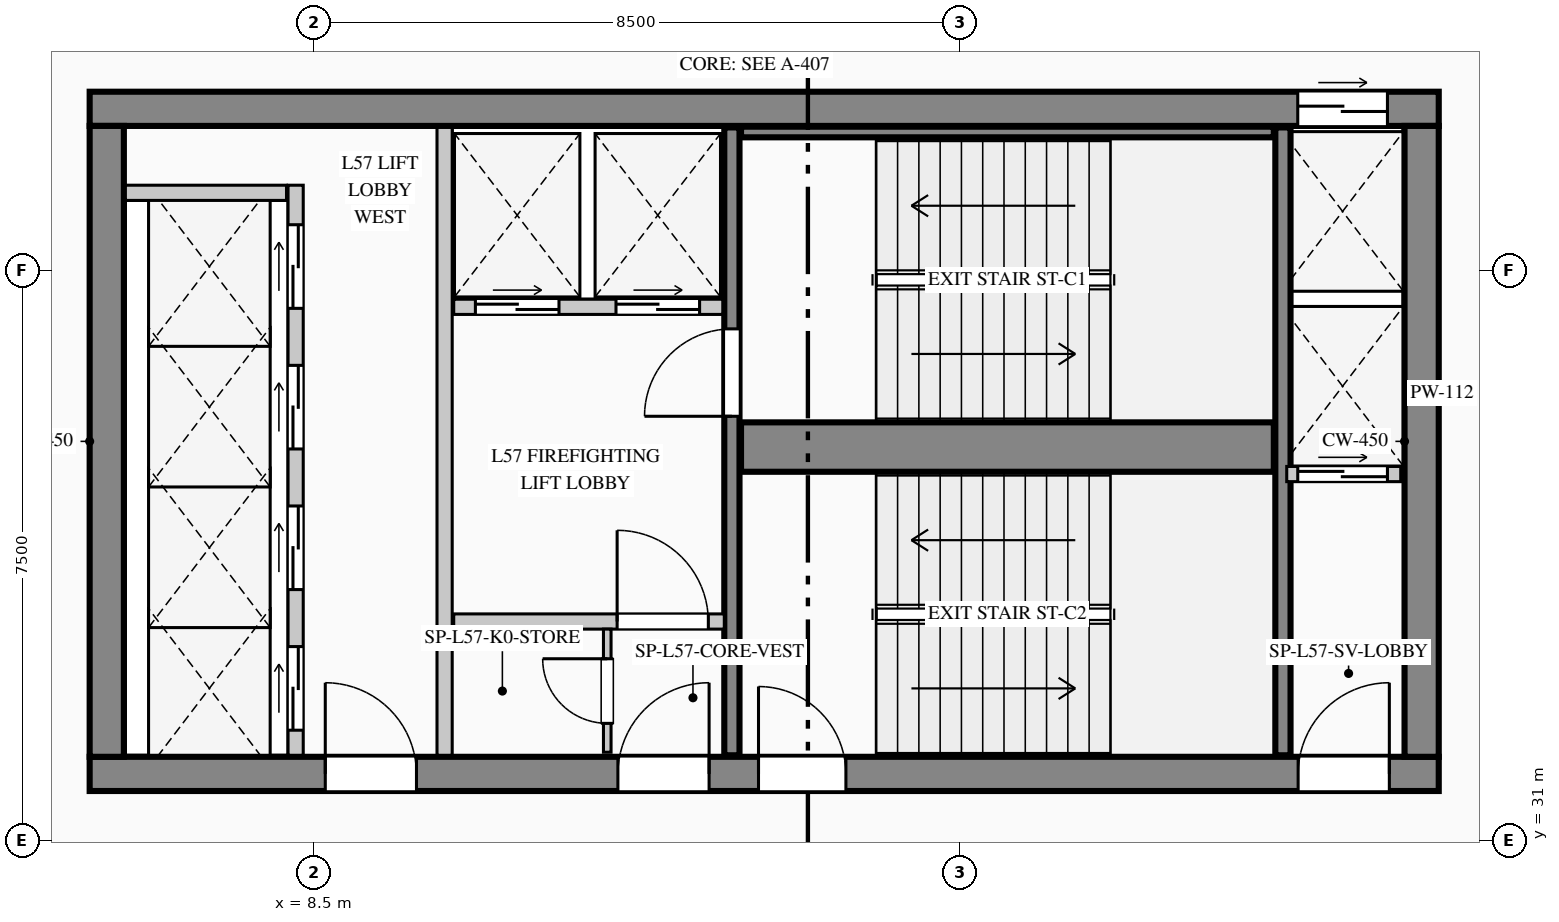
"""IFC4 building model, lengths in metres.
Left out: names, types, materials, properties, quantities, classifications, styles, units other than length and angle.
Written with IfcOpenShell. Run it as: python <this file> out.ifc"""

import sys

from ifc_helpers import new_model, si_unit, direction, frame, frame_2d, origin, place, context, subcontext, project, spatial, rectangle, extrude, element, fill, save


model = new_model("IFC4")
c1 = context("Model", 3, precision=1e-05, world=origin(), true_north=direction((0.0, 1.0)))
c2 = subcontext(c1, "Body", "Model", "MODEL_VIEW")
j1 = project(units=[si_unit("LENGTHUNIT", "METRE"), si_unit("PLANEANGLEUNIT", "RADIAN")], contexts=[c1])
p1 = place(None, origin())
s1 = spatial("IfcSite", under=j1, at=p1, CompositionType="ELEMENT")
p2 = place(p1, origin())
s2 = spatial("IfcBuilding", under=s1, at=p2, CompositionType="ELEMENT")
p3 = place(p2, frame((0.0, 0.0, 239.05)))
s3 = spatial("IfcBuildingStorey", under=s2, at=p3, CompositionType="ELEMENT", Elevation=239.05)
p4 = place(p3, frame((5.55, 40.625, 0.0), z_axis=(0.0, 0.0, 1.0), x_axis=(1.0, 0.0, 0.0)))
e1 = element("IfcWall", 1, at=p4, inside=s3, PredefinedType="SHEAR", context=c2, shape_type="SweptSolid", body=[
    extrude(rectangle(XDim=17.75, YDim=0.45, at=frame_2d((8.875, 0.0))), origin(), (0.0, 0.0, 1.0), 3.95),
])
p5 = place(p4, frame((15.895, 0.0, 0.0)))
e2 = element("IfcOpeningElement", 2, at=p5, cuts=e1, PredefinedType="OPENING", context=c2, shape_type="SweptSolid", body=[
    extrude(rectangle(XDim=1.18, YDim=2.25, at=frame_2d((0.59, 1.125))), frame((0.0, 0.235, 0.0), z_axis=(0.0, -1.0, 0.0), x_axis=(1.0, 0.0, 0.0)), (0.0, 0.0, 1.0), 0.47),
])
p6 = place(p3, frame((5.55, 31.875, 0.0), z_axis=(0.0, 0.0, 1.0), x_axis=(1.0, 0.0, 0.0)))
e3 = element("IfcWall", 3, at=p6, inside=s3, PredefinedType="SHEAR", context=c2, shape_type="SweptSolid", body=[
    extrude(rectangle(XDim=17.75, YDim=0.45, at=frame_2d((8.875, 0.0))), origin(), (0.0, 0.0, 1.0), 3.95),
])
p7 = place(p6, frame((3.1, 0.0, 0.0)))
e4 = element("IfcOpeningElement", 4, at=p7, cuts=e3, PredefinedType="OPENING", context=c2, shape_type="SweptSolid", body=[
    extrude(rectangle(XDim=1.2, YDim=2.2, at=frame_2d((0.6, 1.1))), frame((0.0, 0.235, 0.0), z_axis=(0.0, -1.0, 0.0), x_axis=(1.0, 0.0, 0.0)), (0.0, 0.0, 1.0), 0.47),
])
p8 = place(p6, frame((6.95, 0.0, 0.0)))
e5 = element("IfcOpeningElement", 5, at=p8, cuts=e3, PredefinedType="OPENING", context=c2, shape_type="SweptSolid", body=[
    extrude(rectangle(XDim=1.2, YDim=2.2, at=frame_2d((0.6, 1.1))), frame((0.0, 0.235, 0.0), z_axis=(0.0, -1.0, 0.0), x_axis=(1.0, 0.0, 0.0)), (0.0, 0.0, 1.0), 0.47),
])
p9 = place(p6, frame((8.8, 0.0, 0.0)))
e6 = element("IfcOpeningElement", 6, at=p9, cuts=e3, PredefinedType="OPENING", context=c2, shape_type="SweptSolid", body=[
    extrude(rectangle(XDim=1.15, YDim=2.2, at=frame_2d((0.575, 1.1))), frame((0.0, 0.235, 0.0), z_axis=(0.0, -1.0, 0.0), x_axis=(1.0, 0.0, 0.0)), (0.0, 0.0, 1.0), 0.47),
])
p10 = place(p6, frame((15.9, 0.0, 0.0)))
e7 = element("IfcOpeningElement", 7, at=p10, cuts=e3, PredefinedType="OPENING", context=c2, shape_type="SweptSolid", body=[
    extrude(rectangle(XDim=1.2, YDim=2.2, at=frame_2d((0.6, 1.1))), frame((0.0, 0.235, 0.0), z_axis=(0.0, -1.0, 0.0), x_axis=(1.0, 0.0, 0.0)), (0.0, 0.0, 1.0), 0.47),
])
for number, where, z_axis, x_axis in (
    (8, (5.775, 32.1, 0.0), (0.0, 0.0, 1.0), (0.0, 1.0, 0.0)),
    (9, (23.075, 32.1, 0.0), (0.0, 0.0, 1.0), (0.0, 1.0, 0.0)),
):
    element("IfcWall", number, at=place(p3, frame(where, z_axis=z_axis, x_axis=x_axis)), inside=s3, PredefinedType="SHEAR", context=c2, shape_type="SweptSolid", body=[
        extrude(rectangle(XDim=8.3, YDim=0.45, at=frame_2d((4.15, 0.0))), origin(), (0.0, 0.0, 1.0), 3.95),
    ])
p11 = place(p3, frame((14.0, 32.12, 0.0), z_axis=(0.0, 0.0, 1.0), x_axis=(0.0, 1.0, 0.0)))
e10 = element("IfcWall", 10, at=p11, inside=s3, PredefinedType="SHEAR", context=c2, shape_type="SweptSolid", body=[
    extrude(rectangle(XDim=8.26, YDim=0.2, at=frame_2d((4.13, 0.0))), origin(), (0.0, 0.0, 1.0), 3.95),
])
p12 = place(p11, frame((4.46, 0.0, 0.0)))
e11 = element("IfcOpeningElement", 11, at=p12, cuts=e10, PredefinedType="OPENING", context=c2, shape_type="SweptSolid", body=[
    extrude(rectangle(XDim=1.15, YDim=2.2, at=frame_2d((0.575, 1.1))), frame((0.0, 0.11, 0.0), z_axis=(0.0, -1.0, 0.0), x_axis=(1.0, 0.0, 0.0)), (0.0, 0.0, 1.0), 0.22),
])
p13 = place(p3, frame((14.12, 36.175, 0.0), z_axis=(0.0, 0.0, 1.0), x_axis=(1.0, 0.0, 0.0)))
e12 = element("IfcWall", 12, at=p13, inside=s3, PredefinedType="SHEAR", context=c2, shape_type="SweptSolid", body=[
    extrude(rectangle(XDim=7.01, YDim=0.65, at=frame_2d((3.505, 0.0))), origin(), (0.0, 0.0, 1.0), 3.95),
])
p14 = place(p3, frame((21.25, 32.12, 0.0), z_axis=(0.0, 0.0, 1.0), x_axis=(0.0, 1.0, 0.0)))
e13 = element("IfcWall", 13, at=p14, inside=s3, PredefinedType="SHEAR", context=c2, shape_type="SweptSolid", body=[
    extrude(rectangle(XDim=8.26, YDim=0.2, at=frame_2d((4.13, 0.0))), origin(), (0.0, 0.0, 1.0), 3.95),
])
p15 = place(p3, frame((14.12, 40.32, 0.0), z_axis=(0.0, 0.0, 1.0), x_axis=(1.0, 0.0, 0.0)))
e14 = element("IfcWall", 14, at=p15, inside=s3, PredefinedType="SHEAR", context=c2, shape_type="SweptSolid", body=[
    extrude(rectangle(XDim=7.01, YDim=0.14, at=frame_2d((3.505, 0.0))), origin(), (0.0, 0.0, 1.0), 3.95),
])
p16 = place(p3, frame((6.933, 4.52, 0.0), z_axis=(0.0, 0.0, 1.0), x_axis=(-0.109965284523, 0.993935428587, 0.0)))
e15 = element("IfcWall", 15, at=p16, inside=s3, PredefinedType="STANDARD", context=c2, shape_type="SweptSolid", body=[
    extrude(rectangle(XDim=37.186, YDim=0.24, at=frame_2d((18.593, 0.0))), origin(), (0.0, 0.0, 1.0), 3.7),
])
p17 = place(p16, frame((12.562, 0.0, 0.9)))
e16 = element("IfcOpeningElement", 16, at=p17, cuts=e15, PredefinedType="OPENING", context=c2, shape_type="SweptSolid", body=[
    extrude(rectangle(XDim=1.65, YDim=1.95, at=frame_2d((0.825, 0.975))), frame((0.0, 0.13, 0.0), z_axis=(0.0, -1.0, 0.0), x_axis=(1.0, 0.0, 0.0)), (0.0, 0.0, 1.0), 0.26),
])
p18 = place(p3, frame((8.26, 32.12, 0.0), z_axis=(0.0, 0.0, 1.0), x_axis=(0.0, 1.0, 0.0)))
e17 = element("IfcWall", 17, at=p18, inside=s3, PredefinedType="PARTITIONING", context=c2, shape_type="SweptSolid", body=[
    extrude(rectangle(XDim=7.5, YDim=0.2, at=frame_2d((3.75, 0.0))), origin(), (0.0, 0.0, 1.0), 3.7),
])
p19 = place(p18, frame((0.33, 0.0, 0.0)))
e18 = element("IfcOpeningElement", 18, at=p19, cuts=e17, PredefinedType="OPENING", context=c2, shape_type="SweptSolid", body=[
    extrude(rectangle(XDim=1.1, YDim=2.2, at=frame_2d((0.55, 1.1))), frame((0.0, 0.11, 0.0), z_axis=(0.0, -1.0, 0.0), x_axis=(1.0, 0.0, 0.0)), (0.0, 0.0, 1.0), 0.22),
])
p20 = place(p18, frame((2.18, 0.0, 0.0)))
e19 = element("IfcOpeningElement", 19, at=p20, cuts=e17, PredefinedType="OPENING", context=c2, shape_type="SweptSolid", body=[
    extrude(rectangle(XDim=1.1, YDim=2.2, at=frame_2d((0.55, 1.1))), frame((0.0, 0.11, 0.0), z_axis=(0.0, -1.0, 0.0), x_axis=(1.0, 0.0, 0.0)), (0.0, 0.0, 1.0), 0.22),
])
p21 = place(p18, frame((4.03, 0.0, 0.0)))
e20 = element("IfcOpeningElement", 20, at=p21, cuts=e17, PredefinedType="OPENING", context=c2, shape_type="SweptSolid", body=[
    extrude(rectangle(XDim=1.1, YDim=2.2, at=frame_2d((0.55, 1.1))), frame((0.0, 0.11, 0.0), z_axis=(0.0, -1.0, 0.0), x_axis=(1.0, 0.0, 0.0)), (0.0, 0.0, 1.0), 0.22),
])
p22 = place(p18, frame((5.88, 0.0, 0.0)))
e21 = element("IfcOpeningElement", 21, at=p22, cuts=e17, PredefinedType="OPENING", context=c2, shape_type="SweptSolid", body=[
    extrude(rectangle(XDim=1.1, YDim=2.2, at=frame_2d((0.55, 1.1))), frame((0.0, 0.11, 0.0), z_axis=(0.0, -1.0, 0.0), x_axis=(1.0, 0.0, 0.0)), (0.0, 0.0, 1.0), 0.22),
])
p23 = place(p3, frame((6.02, 39.52, 0.0), z_axis=(0.0, 0.0, 1.0), x_axis=(1.0, 0.0, 0.0)))
e22 = element("IfcWall", 22, at=p23, inside=s3, PredefinedType="PARTITIONING", context=c2, shape_type="SweptSolid", body=[
    extrude(rectangle(XDim=2.12, YDim=0.2, at=frame_2d((1.06, 0.0))), origin(), (0.0, 0.0, 1.0), 3.7),
])
p24 = place(p3, frame((10.22, 32.12, 0.0), z_axis=(0.0, 0.0, 1.0), x_axis=(0.0, 1.0, 0.0)))
e23 = element("IfcWall", 23, at=p24, inside=s3, PredefinedType="PARTITIONING", context=c2, shape_type="SweptSolid", body=[
    extrude(rectangle(XDim=8.26, YDim=0.2, at=frame_2d((4.13, 0.0))), origin(), (0.0, 0.0, 1.0), 3.7),
])
p25 = place(p3, frame((10.34, 38.02, 0.0), z_axis=(0.0, 0.0, 1.0), x_axis=(1.0, 0.0, 0.0)))
e24 = element("IfcWall", 24, at=p25, inside=s3, PredefinedType="PARTITIONING", context=c2, shape_type="SweptSolid", body=[
    extrude(rectangle(XDim=3.54, YDim=0.2, at=frame_2d((1.77, 0.0))), origin(), (0.0, 0.0, 1.0), 3.7),
])
p26 = place(p25, frame((0.285, 0.0, 0.0)))
e25 = element("IfcOpeningElement", 25, at=p26, cuts=e24, PredefinedType="OPENING", context=c2, shape_type="SweptSolid", body=[
    extrude(rectangle(XDim=1.1, YDim=2.2, at=frame_2d((0.55, 1.1))), frame((0.0, 0.11, 0.0), z_axis=(0.0, -1.0, 0.0), x_axis=(1.0, 0.0, 0.0)), (0.0, 0.0, 1.0), 0.22),
])
p27 = place(p25, frame((2.135, 0.0, 0.0)))
e26 = element("IfcOpeningElement", 26, at=p27, cuts=e24, PredefinedType="OPENING", context=c2, shape_type="SweptSolid", body=[
    extrude(rectangle(XDim=1.1, YDim=2.2, at=frame_2d((0.55, 1.1))), frame((0.0, 0.11, 0.0), z_axis=(0.0, -1.0, 0.0), x_axis=(1.0, 0.0, 0.0)), (0.0, 0.0, 1.0), 0.22),
])
p28 = place(p3, frame((10.34, 33.88, 0.0), z_axis=(0.0, 0.0, 1.0), x_axis=(1.0, 0.0, 0.0)))
e27 = element("IfcWall", 27, at=p28, inside=s3, PredefinedType="PARTITIONING", context=c2, shape_type="SweptSolid", body=[
    extrude(rectangle(XDim=3.56, YDim=0.2, at=frame_2d((1.78, 0.0))), origin(), (0.0, 0.0, 1.0), 3.7),
])
p29 = place(p28, frame((2.15, 0.0, 0.0)))
e28 = element("IfcOpeningElement", 28, at=p29, cuts=e27, PredefinedType="OPENING", context=c2, shape_type="SweptSolid", body=[
    extrude(rectangle(XDim=1.2, YDim=2.2, at=frame_2d((0.6, 1.1))), frame((0.0, 0.11, 0.0), z_axis=(0.0, -1.0, 0.0), x_axis=(1.0, 0.0, 0.0)), (0.0, 0.0, 1.0), 0.22),
])
p30 = place(p3, frame((12.36, 32.16, 0.0), z_axis=(0.0, 0.0, 1.0), x_axis=(0.0, 1.0, 0.0)))
e29 = element("IfcWall", 29, at=p30, inside=s3, PredefinedType="PARTITIONING", context=c2, shape_type="SweptSolid", body=[
    extrude(rectangle(XDim=1.62, YDim=0.1, at=frame_2d((0.81, 0.0))), origin(), (0.0, 0.0, 1.0), 3.7),
])
p31 = place(p30, frame((0.38, 0.0, 0.0)))
e30 = element("IfcOpeningElement", 30, at=p31, cuts=e29, PredefinedType="OPENING", context=c2, shape_type="SweptSolid", body=[
    extrude(rectangle(XDim=0.85, YDim=2.1, at=frame_2d((0.425, 1.05))), frame((0.0, 0.06, 0.0), z_axis=(0.0, -1.0, 0.0), x_axis=(1.0, 0.0, 0.0)), (0.0, 0.0, 1.0), 0.12),
])
p32 = place(p3, frame((21.3, 35.82, 0.0), z_axis=(0.0, 0.0, 1.0), x_axis=(1.0, 0.0, 0.0)))
e31 = element("IfcWall", 31, at=p32, inside=s3, PredefinedType="PARTITIONING", context=c2, shape_type="SweptSolid", body=[
    extrude(rectangle(XDim=1.5, YDim=0.2, at=frame_2d((0.75, 0.0))), origin(), (0.0, 0.0, 1.0), 3.7),
])
p33 = place(p32, frame((0.145, 0.0, 0.0)))
e32 = element("IfcOpeningElement", 32, at=p33, cuts=e31, PredefinedType="OPENING", context=c2, shape_type="SweptSolid", body=[
    extrude(rectangle(XDim=1.18, YDim=2.25, at=frame_2d((0.59, 1.125))), frame((0.0, 0.11, 0.0), z_axis=(0.0, -1.0, 0.0), x_axis=(1.0, 0.0, 0.0)), (0.0, 0.0, 1.0), 0.22),
])
p34 = place(p7, origin())
e33 = element("IfcDoor", 33, at=p34, inside=s3, OperationType="SINGLE_SWING_LEFT", PredefinedType="DOOR", context=c2, shape_type="SweptSolid", body=[
    extrude(rectangle(XDim=1.2, YDim=2.2, at=frame_2d((0.6, 1.1))), frame((0.0, 0.025, 0.0), z_axis=(0.0, -1.0, 0.0), x_axis=(1.0, 0.0, 0.0)), (0.0, 0.0, 1.0), 0.05),
])
fill(e4, e33)
p35 = place(p8, origin())
e34 = element("IfcDoor", 34, at=p35, inside=s3, OperationType="SINGLE_SWING_RIGHT", PredefinedType="DOOR", context=c2, shape_type="SweptSolid", body=[
    extrude(rectangle(XDim=1.2, YDim=2.2, at=frame_2d((0.6, 1.1))), frame((0.0, 0.025, 0.0), z_axis=(0.0, -1.0, 0.0), x_axis=(1.0, 0.0, 0.0)), (0.0, 0.0, 1.0), 0.05),
])
fill(e5, e34)
p36 = place(p9, origin())
e35 = element("IfcDoor", 35, at=p36, inside=s3, OperationType="SINGLE_SWING_LEFT", PredefinedType="DOOR", context=c2, shape_type="SweptSolid", body=[
    extrude(rectangle(XDim=1.15, YDim=2.2, at=frame_2d((0.575, 1.1))), frame((0.0, 0.025, 0.0), z_axis=(0.0, -1.0, 0.0), x_axis=(1.0, 0.0, 0.0)), (0.0, 0.0, 1.0), 0.05),
])
fill(e6, e35)
p37 = place(p10, origin())
e36 = element("IfcDoor", 36, at=p37, inside=s3, OperationType="SINGLE_SWING_RIGHT", PredefinedType="DOOR", context=c2, shape_type="SweptSolid", body=[
    extrude(rectangle(XDim=1.2, YDim=2.2, at=frame_2d((0.6, 1.1))), frame((0.0, 0.025, 0.0), z_axis=(0.0, -1.0, 0.0), x_axis=(1.0, 0.0, 0.0)), (0.0, 0.0, 1.0), 0.05),
])
fill(e7, e36)
p38 = place(p29, origin())
e37 = element("IfcDoor", 37, at=p38, inside=s3, OperationType="SINGLE_SWING_LEFT", PredefinedType="DOOR", context=c2, shape_type="SweptSolid", body=[
    extrude(rectangle(XDim=1.2, YDim=2.2, at=frame_2d((0.6, 1.1))), frame((0.0, 0.025, 0.0), z_axis=(0.0, -1.0, 0.0), x_axis=(1.0, 0.0, 0.0)), (0.0, 0.0, 1.0), 0.05),
])
fill(e28, e37)
p39 = place(p31, origin())
e38 = element("IfcDoor", 38, at=p39, inside=s3, OperationType="SINGLE_SWING_RIGHT", PredefinedType="DOOR", context=c2, shape_type="SweptSolid", body=[
    extrude(rectangle(XDim=0.85, YDim=2.1, at=frame_2d((0.425, 1.05))), frame((0.0, 0.025, 0.0), z_axis=(0.0, -1.0, 0.0), x_axis=(1.0, 0.0, 0.0)), (0.0, 0.0, 1.0), 0.05),
])
fill(e30, e38)
p40 = place(p12, origin())
e39 = element("IfcDoor", 39, at=p40, inside=s3, OperationType="SINGLE_SWING_LEFT", PredefinedType="DOOR", context=c2, shape_type="SweptSolid", body=[
    extrude(rectangle(XDim=1.15, YDim=2.2, at=frame_2d((0.575, 1.1))), frame((0.0, 0.025, 0.0), z_axis=(0.0, -1.0, 0.0), x_axis=(1.0, 0.0, 0.0)), (0.0, 0.0, 1.0), 0.05),
])
fill(e11, e39)
p41 = place(p19, origin())
e40 = element("IfcDoor", 40, at=p41, inside=s3, OperationType="DOUBLE_DOOR_SLIDING", PredefinedType="DOOR", context=c2, shape_type="SweptSolid", body=[
    extrude(rectangle(XDim=1.1, YDim=2.2, at=frame_2d((0.55, 1.1))), frame((0.0, 0.025, 0.0), z_axis=(0.0, -1.0, 0.0), x_axis=(1.0, 0.0, 0.0)), (0.0, 0.0, 1.0), 0.05),
])
fill(e18, e40)
p42 = place(p20, origin())
e41 = element("IfcDoor", 41, at=p42, inside=s3, OperationType="DOUBLE_DOOR_SLIDING", PredefinedType="DOOR", context=c2, shape_type="SweptSolid", body=[
    extrude(rectangle(XDim=1.1, YDim=2.2, at=frame_2d((0.55, 1.1))), frame((0.0, 0.025, 0.0), z_axis=(0.0, -1.0, 0.0), x_axis=(1.0, 0.0, 0.0)), (0.0, 0.0, 1.0), 0.05),
])
fill(e19, e41)
p43 = place(p21, origin())
e42 = element("IfcDoor", 42, at=p43, inside=s3, OperationType="DOUBLE_DOOR_SLIDING", PredefinedType="DOOR", context=c2, shape_type="SweptSolid", body=[
    extrude(rectangle(XDim=1.1, YDim=2.2, at=frame_2d((0.55, 1.1))), frame((0.0, 0.025, 0.0), z_axis=(0.0, -1.0, 0.0), x_axis=(1.0, 0.0, 0.0)), (0.0, 0.0, 1.0), 0.05),
])
fill(e20, e42)
p44 = place(p22, origin())
e43 = element("IfcDoor", 43, at=p44, inside=s3, OperationType="DOUBLE_DOOR_SLIDING", PredefinedType="DOOR", context=c2, shape_type="SweptSolid", body=[
    extrude(rectangle(XDim=1.1, YDim=2.2, at=frame_2d((0.55, 1.1))), frame((0.0, 0.025, 0.0), z_axis=(0.0, -1.0, 0.0), x_axis=(1.0, 0.0, 0.0)), (0.0, 0.0, 1.0), 0.05),
])
fill(e21, e43)
p45 = place(p26, origin())
e44 = element("IfcDoor", 44, at=p45, inside=s3, OperationType="DOUBLE_DOOR_SLIDING", PredefinedType="DOOR", context=c2, shape_type="SweptSolid", body=[
    extrude(rectangle(XDim=1.1, YDim=2.2, at=frame_2d((0.55, 1.1))), frame((0.0, 0.025, 0.0), z_axis=(0.0, -1.0, 0.0), x_axis=(1.0, 0.0, 0.0)), (0.0, 0.0, 1.0), 0.05),
])
fill(e25, e44)
p46 = place(p27, origin())
e45 = element("IfcDoor", 45, at=p46, inside=s3, OperationType="DOUBLE_DOOR_SLIDING", PredefinedType="DOOR", context=c2, shape_type="SweptSolid", body=[
    extrude(rectangle(XDim=1.1, YDim=2.2, at=frame_2d((0.55, 1.1))), frame((0.0, 0.025, 0.0), z_axis=(0.0, -1.0, 0.0), x_axis=(1.0, 0.0, 0.0)), (0.0, 0.0, 1.0), 0.05),
])
fill(e26, e45)
p47 = place(p5, origin())
e46 = element("IfcDoor", 46, at=p47, inside=s3, OperationType="DOUBLE_DOOR_SLIDING", PredefinedType="DOOR", context=c2, shape_type="SweptSolid", body=[
    extrude(rectangle(XDim=1.18, YDim=2.25, at=frame_2d((0.59, 1.125))), frame((0.0, 0.025, 0.0), z_axis=(0.0, -1.0, 0.0), x_axis=(1.0, 0.0, 0.0)), (0.0, 0.0, 1.0), 0.05),
])
fill(e2, e46)
p48 = place(p33, origin())
e47 = element("IfcDoor", 47, at=p48, inside=s3, OperationType="DOUBLE_DOOR_SLIDING", PredefinedType="DOOR", context=c2, shape_type="SweptSolid", body=[
    extrude(rectangle(XDim=1.18, YDim=2.25, at=frame_2d((0.59, 1.125))), frame((0.0, 0.025, 0.0), z_axis=(0.0, -1.0, 0.0), x_axis=(1.0, 0.0, 0.0)), (0.0, 0.0, 1.0), 0.05),
])
fill(e32, e47)
save(model, sys.argv[1])
